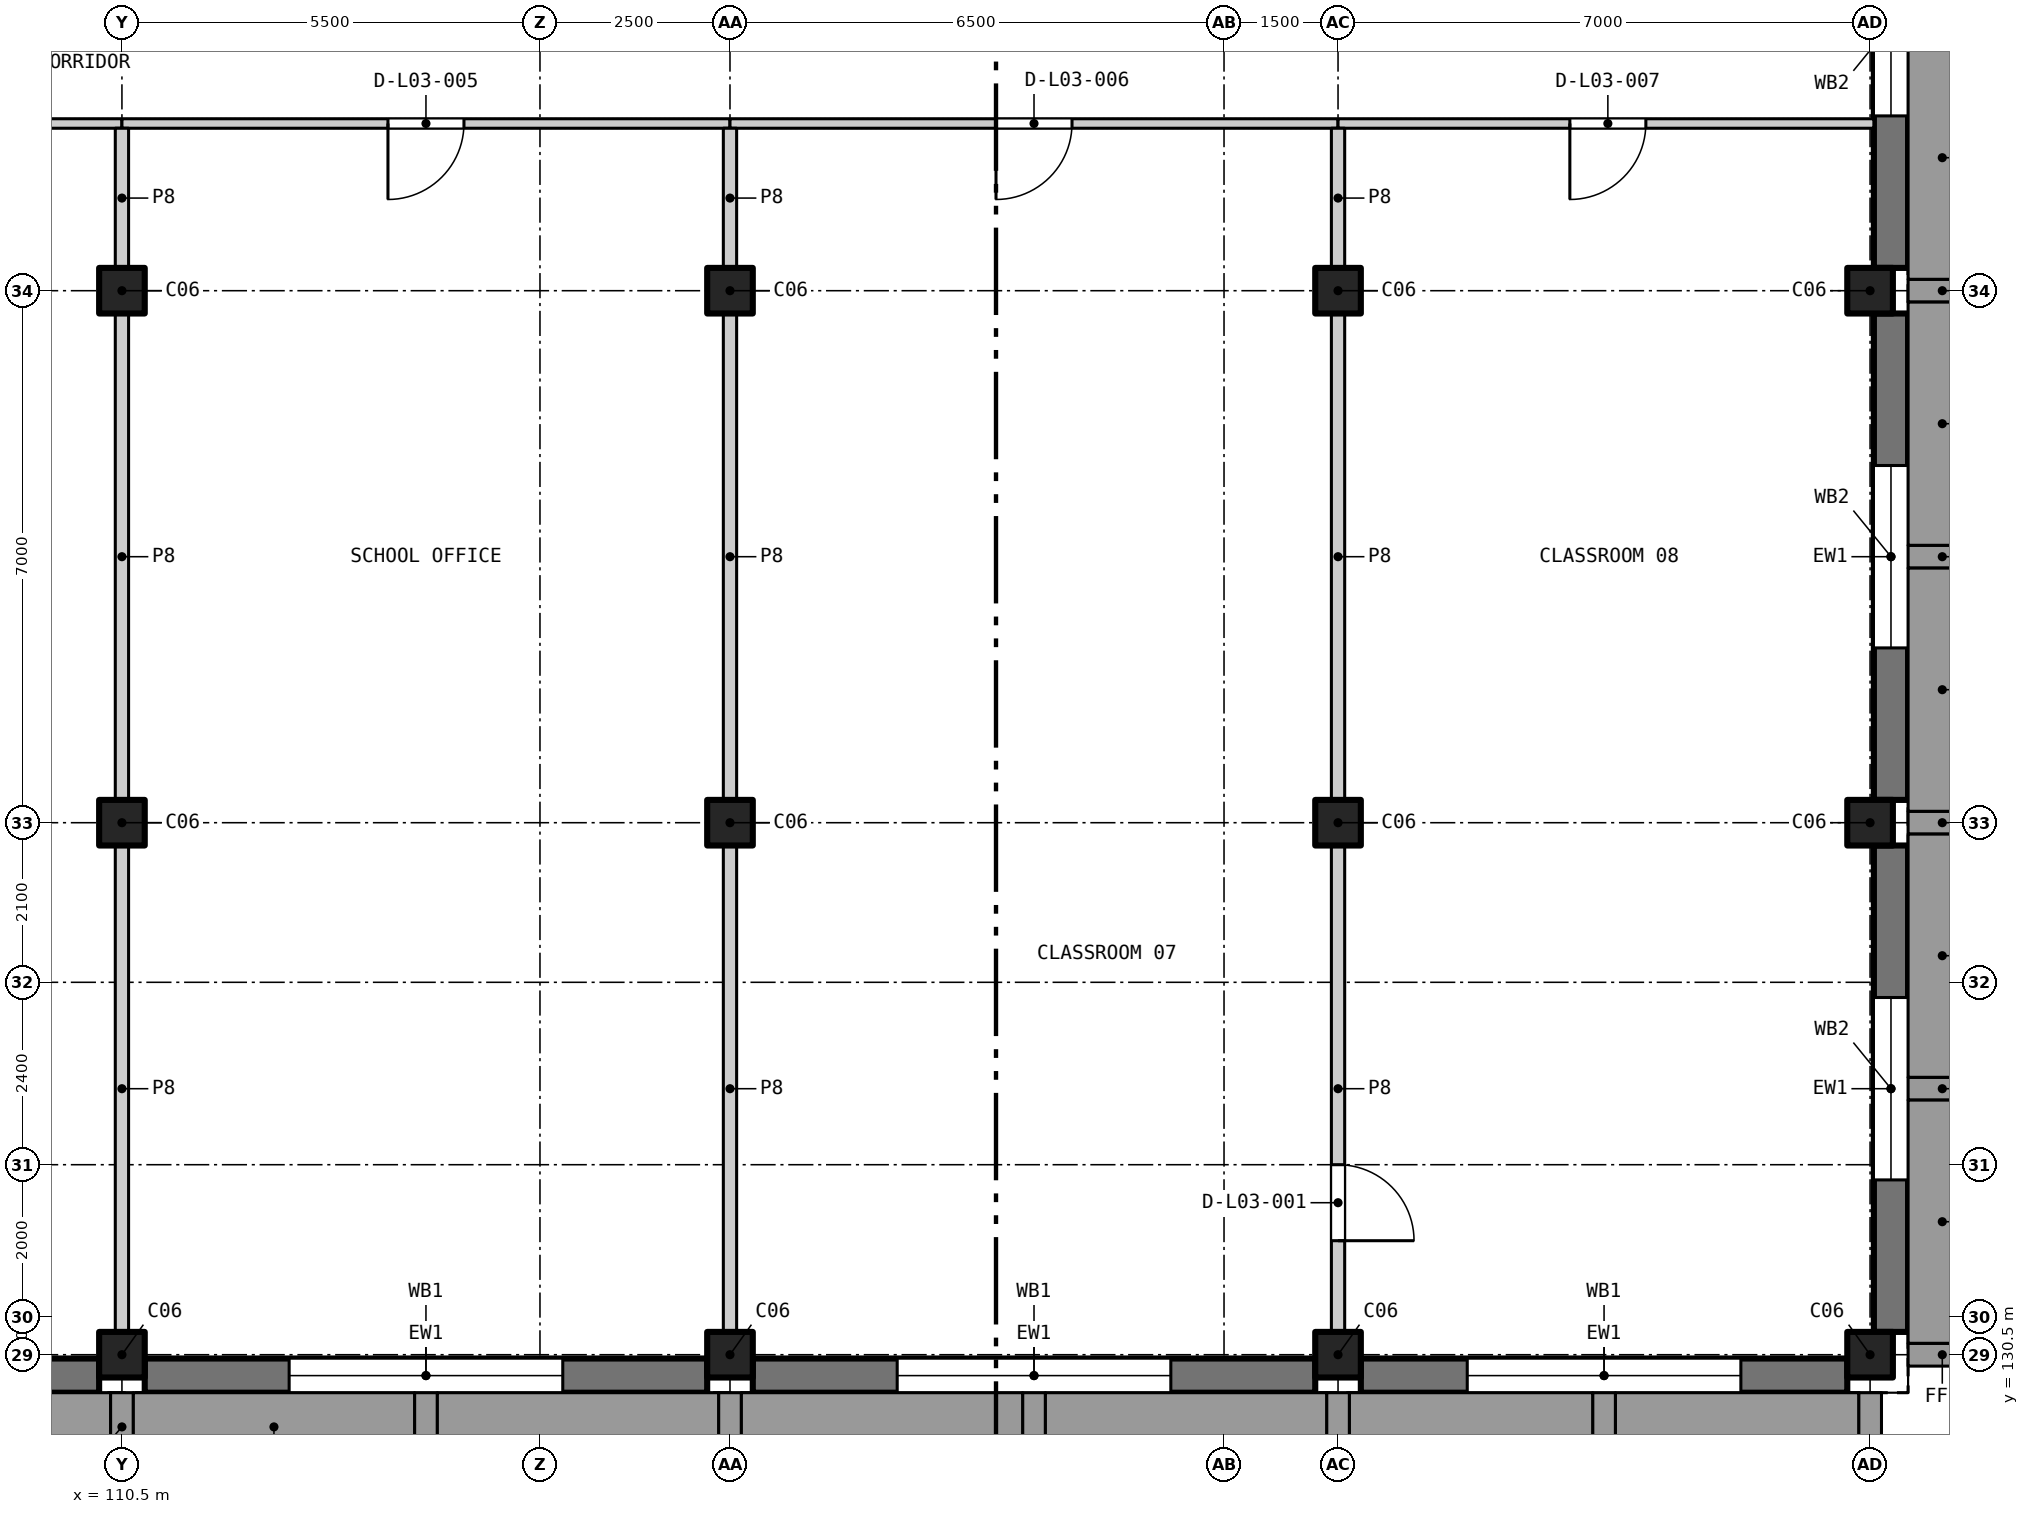
"""IFC4 building model, lengths in metres.
Left out: names, types, materials, properties, quantities, classifications, styles, units other than length and angle.
Written with IfcOpenShell. Run it as: python <this file> out.ifc"""

import sys

from ifc_helpers import new_model, si_unit, direction, frame, frame_2d, origin, origin_2d, place, context, subcontext, project, spatial, rectangle, extrude, element, fill, save


model = new_model("IFC4")
c1 = context("Model", 3, precision=1e-05, world=origin(), true_north=direction((0.0, 1.0)))
c2 = subcontext(c1, "Body", "Model", "MODEL_VIEW")
j1 = project(units=[si_unit("LENGTHUNIT", "METRE"), si_unit("PLANEANGLEUNIT", "RADIAN")], contexts=[c1])
p1 = place(None, origin())
s1 = spatial("IfcSite", under=j1, at=p1, CompositionType="ELEMENT")
p2 = place(p1, origin())
s2 = spatial("IfcBuilding", under=s1, at=p2, CompositionType="ELEMENT")
p3 = place(p2, frame((0.0, 0.0, 14.4)))
s3 = spatial("IfcBuildingStorey", under=s2, at=p3, CompositionType="ELEMENT", Elevation=14.4)
for number, where, z_axis, x_axis in (
    (1, (110.5, 130.5, 0.0), (0.0, 0.0, 1.0), (1.0, 0.0, 0.0)),
    (2, (110.5, 137.5, 0.0), (0.0, 0.0, 1.0), (1.0, 0.0, 0.0)),
    (3, (110.5, 144.5, 0.0), (0.0, 0.0, 1.0), (1.0, 0.0, 0.0)),
    (4, (118.5, 130.5, 0.0), (0.0, 0.0, 1.0), (1.0, 0.0, 0.0)),
    (5, (118.5, 137.5, 0.0), (0.0, 0.0, 1.0), (1.0, 0.0, 0.0)),
    (6, (118.5, 144.5, 0.0), (0.0, 0.0, 1.0), (1.0, 0.0, 0.0)),
    (7, (126.5, 130.5, 0.0), (0.0, 0.0, 1.0), (1.0, 0.0, 0.0)),
    (8, (126.5, 137.5, 0.0), (0.0, 0.0, 1.0), (1.0, 0.0, 0.0)),
    (9, (126.5, 144.5, 0.0), (0.0, 0.0, 1.0), (1.0, 0.0, 0.0)),
    (10, (133.5, 130.5, 0.0), (0.0, 0.0, 1.0), (1.0, 0.0, 0.0)),
    (11, (133.5, 137.5, 0.0), (0.0, 0.0, 1.0), (1.0, 0.0, 0.0)),
    (12, (133.5, 144.5, 0.0), (0.0, 0.0, 1.0), (1.0, 0.0, 0.0)),
):
    element("IfcColumn", number, at=place(p3, frame(where, z_axis=z_axis, x_axis=x_axis)), inside=s3, PredefinedType="COLUMN", context=c2, shape_type="SweptSolid", body=[
        extrude(rectangle(XDim=0.6, YDim=0.6, at=origin_2d()), origin(), (0.0, 0.0, 1.0), 3.9),
    ])
p4 = place(p3, frame((134.0, 130.125, 4.2), z_axis=(0.0, 0.0, 1.0), x_axis=(-1.0, 0.0, 0.0)))
e13 = element("IfcWall", 13, at=p4, inside=s3, PredefinedType="PARAPET", context=c2, shape_type="SweptSolid", body=[
    extrude(rectangle(XDim=48.0, YDim=0.25, at=frame_2d((24.0, 0.0))), origin(), (0.0, 0.0, 1.0), 1.1),
])
p5 = place(p3, frame((133.875, 165.75, 4.2), z_axis=(0.0, 0.0, 1.0), x_axis=(0.0, -1.0, 0.0)))
e14 = element("IfcWall", 14, at=p5, inside=s3, PredefinedType="PARAPET", context=c2, shape_type="SweptSolid", body=[
    extrude(rectangle(XDim=35.5, YDim=0.25, at=frame_2d((17.75, 0.0))), origin(), (0.0, 0.0, 1.0), 1.1),
])
p6 = place(p3, frame((110.2, 130.225, 0.0), z_axis=(0.0, 0.0, 1.0), x_axis=(-1.0, 0.0, 0.0)))
e15 = element("IfcWall", 15, at=p6, inside=s3, PredefinedType="SOLIDWALL", context=c2, shape_type="SweptSolid", body=[
    extrude(rectangle(XDim=7.4, YDim=0.45, at=frame_2d((3.7, 0.0))), origin(), (0.0, 0.0, 1.0), 3.0),
])
p7 = place(p6, frame((1.9, 0.0, 0.9)))
e16 = element("IfcOpeningElement", 16, at=p7, cuts=e15, PredefinedType="OPENING", context=c2, shape_type="SweptSolid", body=[
    extrude(rectangle(XDim=3.6, YDim=1.6, at=frame_2d((1.8, 0.8))), frame((0.0, 0.235, 0.0), z_axis=(0.0, -1.0, 0.0), x_axis=(1.0, 0.0, 0.0)), (0.0, 0.0, 1.0), 0.47),
])
p8 = place(p3, frame((118.2, 130.225, 0.0), z_axis=(0.0, 0.0, 1.0), x_axis=(-1.0, 0.0, 0.0)))
e17 = element("IfcWall", 17, at=p8, inside=s3, PredefinedType="SOLIDWALL", context=c2, shape_type="SweptSolid", body=[
    extrude(rectangle(XDim=7.4, YDim=0.45, at=frame_2d((3.7, 0.0))), origin(), (0.0, 0.0, 1.0), 3.0),
])
p9 = place(p8, frame((1.9, 0.0, 0.9)))
e18 = element("IfcOpeningElement", 18, at=p9, cuts=e17, PredefinedType="OPENING", context=c2, shape_type="SweptSolid", body=[
    extrude(rectangle(XDim=3.6, YDim=1.6, at=frame_2d((1.8, 0.8))), frame((0.0, 0.235, 0.0), z_axis=(0.0, -1.0, 0.0), x_axis=(1.0, 0.0, 0.0)), (0.0, 0.0, 1.0), 0.47),
])
p10 = place(p3, frame((126.2, 130.225, 0.0), z_axis=(0.0, 0.0, 1.0), x_axis=(-1.0, 0.0, 0.0)))
e19 = element("IfcWall", 19, at=p10, inside=s3, PredefinedType="SOLIDWALL", context=c2, shape_type="SweptSolid", body=[
    extrude(rectangle(XDim=7.4, YDim=0.45, at=frame_2d((3.7, 0.0))), origin(), (0.0, 0.0, 1.0), 3.0),
])
p11 = place(p10, frame((1.9, 0.0, 0.9)))
e20 = element("IfcOpeningElement", 20, at=p11, cuts=e19, PredefinedType="OPENING", context=c2, shape_type="SweptSolid", body=[
    extrude(rectangle(XDim=3.6, YDim=1.6, at=frame_2d((1.8, 0.8))), frame((0.0, 0.235, 0.0), z_axis=(0.0, -1.0, 0.0), x_axis=(1.0, 0.0, 0.0)), (0.0, 0.0, 1.0), 0.47),
])
p12 = place(p3, frame((133.2, 130.225, 0.0), z_axis=(0.0, 0.0, 1.0), x_axis=(-1.0, 0.0, 0.0)))
e21 = element("IfcWall", 21, at=p12, inside=s3, PredefinedType="SOLIDWALL", context=c2, shape_type="SweptSolid", body=[
    extrude(rectangle(XDim=6.4, YDim=0.45, at=frame_2d((3.2, 0.0))), origin(), (0.0, 0.0, 1.0), 3.0),
])
p13 = place(p12, frame((1.4, 0.0, 0.9)))
e22 = element("IfcOpeningElement", 22, at=p13, cuts=e21, PredefinedType="OPENING", context=c2, shape_type="SweptSolid", body=[
    extrude(rectangle(XDim=3.6, YDim=1.6, at=frame_2d((1.8, 0.8))), frame((0.0, 0.235, 0.0), z_axis=(0.0, -1.0, 0.0), x_axis=(1.0, 0.0, 0.0)), (0.0, 0.0, 1.0), 0.47),
])
p14 = place(p3, frame((133.775, 137.2, 0.0), z_axis=(0.0, 0.0, 1.0), x_axis=(0.0, -1.0, 0.0)))
e23 = element("IfcWall", 23, at=p14, inside=s3, PredefinedType="SOLIDWALL", context=c2, shape_type="SweptSolid", body=[
    extrude(rectangle(XDim=6.4, YDim=0.45, at=frame_2d((3.2, 0.0))), origin(), (0.0, 0.0, 1.0), 3.1),
])
p15 = place(p14, frame((2.0, 0.0, 0.9)))
e24 = element("IfcOpeningElement", 24, at=p15, cuts=e23, PredefinedType="OPENING", context=c2, shape_type="SweptSolid", body=[
    extrude(rectangle(XDim=2.4, YDim=1.6, at=frame_2d((1.2, 0.8))), frame((0.0, 0.235, 0.0), z_axis=(0.0, -1.0, 0.0), x_axis=(1.0, 0.0, 0.0)), (0.0, 0.0, 1.0), 0.47),
])
p16 = place(p3, frame((133.775, 144.2, 0.0), z_axis=(0.0, 0.0, 1.0), x_axis=(0.0, -1.0, 0.0)))
e25 = element("IfcWall", 25, at=p16, inside=s3, PredefinedType="SOLIDWALL", context=c2, shape_type="SweptSolid", body=[
    extrude(rectangle(XDim=6.4, YDim=0.45, at=frame_2d((3.2, 0.0))), origin(), (0.0, 0.0, 1.0), 3.1),
])
p17 = place(p16, frame((2.0, 0.0, 0.9)))
e26 = element("IfcOpeningElement", 26, at=p17, cuts=e25, PredefinedType="OPENING", context=c2, shape_type="SweptSolid", body=[
    extrude(rectangle(XDim=2.4, YDim=1.6, at=frame_2d((1.2, 0.8))), frame((0.0, 0.235, 0.0), z_axis=(0.0, -1.0, 0.0), x_axis=(1.0, 0.0, 0.0)), (0.0, 0.0, 1.0), 0.47),
])
p18 = place(p3, frame((133.775, 151.2, 0.0), z_axis=(0.0, 0.0, 1.0), x_axis=(0.0, -1.0, 0.0)))
e27 = element("IfcWall", 27, at=p18, inside=s3, PredefinedType="SOLIDWALL", context=c2, shape_type="SweptSolid", body=[
    extrude(rectangle(XDim=6.4, YDim=0.45, at=frame_2d((3.2, 0.0))), origin(), (0.0, 0.0, 1.0), 3.1),
])
p19 = place(p18, frame((2.0, 0.0, 0.9)))
e28 = element("IfcOpeningElement", 28, at=p19, cuts=e27, PredefinedType="OPENING", context=c2, shape_type="SweptSolid", body=[
    extrude(rectangle(XDim=2.4, YDim=1.6, at=frame_2d((1.2, 0.8))), frame((0.0, 0.235, 0.0), z_axis=(0.0, -1.0, 0.0), x_axis=(1.0, 0.0, 0.0)), (0.0, 0.0, 1.0), 0.47),
])
p20 = place(p3, frame((102.5, 146.7, 0.0), z_axis=(0.0, 0.0, 1.0), x_axis=(1.0, 0.0, 0.0)))
e29 = element("IfcWall", 29, at=p20, inside=s3, PredefinedType="PARTITIONING", context=c2, shape_type="SweptSolid", body=[
    extrude(rectangle(XDim=8.0, YDim=0.125, at=frame_2d((4.0, 0.0))), origin(), (0.0, 0.0, 1.0), 3.9),
])
p21 = place(p20, frame((3.5, 0.0, 0.0)))
e30 = element("IfcOpeningElement", 30, at=p21, cuts=e29, PredefinedType="OPENING", context=c2, shape_type="SweptSolid", body=[
    extrude(rectangle(XDim=1.0, YDim=2.1, at=frame_2d((0.5, 1.05))), frame((0.0, 0.073, 0.0), z_axis=(0.0, -1.0, 0.0), x_axis=(1.0, 0.0, 0.0)), (0.0, 0.0, 1.0), 0.145),
])
p22 = place(p3, frame((110.5, 146.7, 0.0), z_axis=(0.0, 0.0, 1.0), x_axis=(1.0, 0.0, 0.0)))
e31 = element("IfcWall", 31, at=p22, inside=s3, PredefinedType="PARTITIONING", context=c2, shape_type="SweptSolid", body=[
    extrude(rectangle(XDim=8.0, YDim=0.125, at=frame_2d((4.0, 0.0))), origin(), (0.0, 0.0, 1.0), 3.9),
])
p23 = place(p22, frame((3.5, 0.0, 0.0)))
e32 = element("IfcOpeningElement", 32, at=p23, cuts=e31, PredefinedType="OPENING", context=c2, shape_type="SweptSolid", body=[
    extrude(rectangle(XDim=1.0, YDim=2.1, at=frame_2d((0.5, 1.05))), frame((0.0, 0.073, 0.0), z_axis=(0.0, -1.0, 0.0), x_axis=(1.0, 0.0, 0.0)), (0.0, 0.0, 1.0), 0.145),
])
p24 = place(p3, frame((118.5, 146.7, 0.0), z_axis=(0.0, 0.0, 1.0), x_axis=(1.0, 0.0, 0.0)))
e33 = element("IfcWall", 33, at=p24, inside=s3, PredefinedType="PARTITIONING", context=c2, shape_type="SweptSolid", body=[
    extrude(rectangle(XDim=8.0, YDim=0.125, at=frame_2d((4.0, 0.0))), origin(), (0.0, 0.0, 1.0), 3.9),
])
p25 = place(p24, frame((3.5, 0.0, 0.0)))
e34 = element("IfcOpeningElement", 34, at=p25, cuts=e33, PredefinedType="OPENING", context=c2, shape_type="SweptSolid", body=[
    extrude(rectangle(XDim=1.0, YDim=2.1, at=frame_2d((0.5, 1.05))), frame((0.0, 0.073, 0.0), z_axis=(0.0, -1.0, 0.0), x_axis=(1.0, 0.0, 0.0)), (0.0, 0.0, 1.0), 0.145),
])
p26 = place(p3, frame((126.5, 146.7, 0.0), z_axis=(0.0, 0.0, 1.0), x_axis=(1.0, 0.0, 0.0)))
e35 = element("IfcWall", 35, at=p26, inside=s3, PredefinedType="PARTITIONING", context=c2, shape_type="SweptSolid", body=[
    extrude(rectangle(XDim=7.05, YDim=0.125, at=frame_2d((3.525, 0.0))), origin(), (0.0, 0.0, 1.0), 3.9),
])
p27 = place(p26, frame((3.05, 0.0, 0.0)))
e36 = element("IfcOpeningElement", 36, at=p27, cuts=e35, PredefinedType="OPENING", context=c2, shape_type="SweptSolid", body=[
    extrude(rectangle(XDim=1.0, YDim=2.1, at=frame_2d((0.5, 1.05))), frame((0.0, 0.073, 0.0), z_axis=(0.0, -1.0, 0.0), x_axis=(1.0, 0.0, 0.0)), (0.0, 0.0, 1.0), 0.145),
])
for number, where, z_axis, x_axis in (
    (37, (110.5, 130.8, 0.0), (0.0, 0.0, 1.0), (0.0, 1.0, 0.0)),
    (38, (110.5, 137.8, 0.0), (0.0, 0.0, 1.0), (0.0, 1.0, 0.0)),
):
    element("IfcWall", number, at=place(p3, frame(where, z_axis=z_axis, x_axis=x_axis)), inside=s3, PredefinedType="PARTITIONING", context=c2, shape_type="SweptSolid", body=[
        extrude(rectangle(XDim=6.4, YDim=0.175, at=frame_2d((3.2, 0.0))), origin(), (0.0, 0.0, 1.0), 3.1),
    ])
p28 = place(p3, frame((110.5, 144.8, 0.0), z_axis=(0.0, 0.0, 1.0), x_axis=(0.0, 1.0, 0.0)))
e39 = element("IfcWall", 39, at=p28, inside=s3, PredefinedType="PARTITIONING", context=c2, shape_type="SweptSolid", body=[
    extrude(rectangle(XDim=1.837, YDim=0.175, at=frame_2d((0.919, 0.0))), origin(), (0.0, 0.0, 1.0), 3.1),
])
for number, where, z_axis, x_axis in (
    (40, (118.5, 130.8, 0.0), (0.0, 0.0, 1.0), (0.0, 1.0, 0.0)),
    (41, (118.5, 137.8, 0.0), (0.0, 0.0, 1.0), (0.0, 1.0, 0.0)),
):
    element("IfcWall", number, at=place(p3, frame(where, z_axis=z_axis, x_axis=x_axis)), inside=s3, PredefinedType="PARTITIONING", context=c2, shape_type="SweptSolid", body=[
        extrude(rectangle(XDim=6.4, YDim=0.175, at=frame_2d((3.2, 0.0))), origin(), (0.0, 0.0, 1.0), 3.1),
    ])
p29 = place(p3, frame((118.5, 144.8, 0.0), z_axis=(0.0, 0.0, 1.0), x_axis=(0.0, 1.0, 0.0)))
e42 = element("IfcWall", 42, at=p29, inside=s3, PredefinedType="PARTITIONING", context=c2, shape_type="SweptSolid", body=[
    extrude(rectangle(XDim=1.837, YDim=0.175, at=frame_2d((0.919, 0.0))), origin(), (0.0, 0.0, 1.0), 3.1),
])
p30 = place(p3, frame((126.5, 130.8, 0.0), z_axis=(0.0, 0.0, 1.0), x_axis=(0.0, 1.0, 0.0)))
e43 = element("IfcWall", 43, at=p30, inside=s3, PredefinedType="PARTITIONING", context=c2, shape_type="SweptSolid", body=[
    extrude(rectangle(XDim=6.4, YDim=0.175, at=frame_2d((3.2, 0.0))), origin(), (0.0, 0.0, 1.0), 3.1),
])
p31 = place(p30, frame((1.2, 0.0, 0.0)))
e44 = element("IfcOpeningElement", 44, at=p31, cuts=e43, PredefinedType="OPENING", context=c2, shape_type="SweptSolid", body=[
    extrude(rectangle(XDim=1.0, YDim=2.1, at=frame_2d((0.5, 1.05))), frame((0.0, 0.097, 0.0), z_axis=(0.0, -1.0, 0.0), x_axis=(1.0, 0.0, 0.0)), (0.0, 0.0, 1.0), 0.195),
])
p32 = place(p3, frame((126.5, 137.8, 0.0), z_axis=(0.0, 0.0, 1.0), x_axis=(0.0, 1.0, 0.0)))
e45 = element("IfcWall", 45, at=p32, inside=s3, PredefinedType="PARTITIONING", context=c2, shape_type="SweptSolid", body=[
    extrude(rectangle(XDim=6.4, YDim=0.175, at=frame_2d((3.2, 0.0))), origin(), (0.0, 0.0, 1.0), 3.1),
])
p33 = place(p3, frame((126.5, 144.8, 0.0), z_axis=(0.0, 0.0, 1.0), x_axis=(0.0, 1.0, 0.0)))
e46 = element("IfcWall", 46, at=p33, inside=s3, PredefinedType="PARTITIONING", context=c2, shape_type="SweptSolid", body=[
    extrude(rectangle(XDim=1.837, YDim=0.175, at=frame_2d((0.919, 0.0))), origin(), (0.0, 0.0, 1.0), 3.1),
])
p34 = place(p9, origin())
e47 = element("IfcWindow", 47, at=p34, inside=s3, PartitioningType="SINGLE_PANEL", PredefinedType="WINDOW", context=c2, shape_type="SweptSolid", body=[
    extrude(rectangle(XDim=3.6, YDim=1.6, at=frame_2d((1.8, 0.8))), frame((0.0, -0.125, 0.0), z_axis=(0.0, -1.0, 0.0), x_axis=(1.0, 0.0, 0.0)), (0.0, 0.0, 1.0), 0.06),
])
fill(e18, e47)
p35 = place(p11, origin())
e48 = element("IfcWindow", 48, at=p35, inside=s3, PartitioningType="SINGLE_PANEL", PredefinedType="WINDOW", context=c2, shape_type="SweptSolid", body=[
    extrude(rectangle(XDim=3.6, YDim=1.6, at=frame_2d((1.8, 0.8))), frame((0.0, -0.125, 0.0), z_axis=(0.0, -1.0, 0.0), x_axis=(1.0, 0.0, 0.0)), (0.0, 0.0, 1.0), 0.06),
])
fill(e20, e48)
p36 = place(p13, origin())
e49 = element("IfcWindow", 49, at=p36, inside=s3, PartitioningType="SINGLE_PANEL", PredefinedType="WINDOW", context=c2, shape_type="SweptSolid", body=[
    extrude(rectangle(XDim=3.6, YDim=1.6, at=frame_2d((1.8, 0.8))), frame((0.0, -0.125, 0.0), z_axis=(0.0, -1.0, 0.0), x_axis=(1.0, 0.0, 0.0)), (0.0, 0.0, 1.0), 0.06),
])
fill(e22, e49)
p37 = place(p15, origin())
e50 = element("IfcWindow", 50, at=p37, inside=s3, PartitioningType="SINGLE_PANEL", PredefinedType="WINDOW", context=c2, shape_type="SweptSolid", body=[
    extrude(rectangle(XDim=2.4, YDim=1.6, at=frame_2d((1.2, 0.8))), frame((0.0, -0.125, 0.0), z_axis=(0.0, -1.0, 0.0), x_axis=(1.0, 0.0, 0.0)), (0.0, 0.0, 1.0), 0.06),
])
fill(e24, e50)
p38 = place(p17, origin())
e51 = element("IfcWindow", 51, at=p38, inside=s3, PartitioningType="SINGLE_PANEL", PredefinedType="WINDOW", context=c2, shape_type="SweptSolid", body=[
    extrude(rectangle(XDim=2.4, YDim=1.6, at=frame_2d((1.2, 0.8))), frame((0.0, -0.125, 0.0), z_axis=(0.0, -1.0, 0.0), x_axis=(1.0, 0.0, 0.0)), (0.0, 0.0, 1.0), 0.06),
])
fill(e26, e51)
p39 = place(p19, origin())
e52 = element("IfcWindow", 52, at=p39, inside=s3, PartitioningType="SINGLE_PANEL", PredefinedType="WINDOW", context=c2, shape_type="SweptSolid", body=[
    extrude(rectangle(XDim=2.4, YDim=1.6, at=frame_2d((1.2, 0.8))), frame((0.0, -0.125, 0.0), z_axis=(0.0, -1.0, 0.0), x_axis=(1.0, 0.0, 0.0)), (0.0, 0.0, 1.0), 0.06),
])
fill(e28, e52)
p40 = place(p31, frame((1.0, 0.0, 0.0), z_axis=(0.0, 0.0, 1.0), x_axis=(-1.0, 0.0, 0.0)))
e53 = element("IfcDoor", 53, at=p40, inside=s3, OperationType="SINGLE_SWING_RIGHT", PredefinedType="DOOR", context=c2, shape_type="SweptSolid", body=[
    extrude(rectangle(XDim=1.0, YDim=2.1, at=frame_2d((0.5, 1.05))), frame((0.0, 0.025, 0.0), z_axis=(0.0, -1.0, 0.0), x_axis=(1.0, 0.0, 0.0)), (0.0, 0.0, 1.0), 0.05),
])
fill(e44, e53)
p41 = place(p23, frame((1.0, 0.0, 0.0), z_axis=(0.0, 0.0, 1.0), x_axis=(-1.0, 0.0, 0.0)))
e54 = element("IfcDoor", 54, at=p41, inside=s3, OperationType="SINGLE_SWING_RIGHT", PredefinedType="DOOR", context=c2, shape_type="SweptSolid", body=[
    extrude(rectangle(XDim=1.0, YDim=2.1, at=frame_2d((0.5, 1.05))), frame((0.0, 0.025, 0.0), z_axis=(0.0, -1.0, 0.0), x_axis=(1.0, 0.0, 0.0)), (0.0, 0.0, 1.0), 0.05),
])
fill(e32, e54)
p42 = place(p25, frame((1.0, 0.0, 0.0), z_axis=(0.0, 0.0, 1.0), x_axis=(-1.0, 0.0, 0.0)))
e55 = element("IfcDoor", 55, at=p42, inside=s3, OperationType="SINGLE_SWING_RIGHT", PredefinedType="DOOR", context=c2, shape_type="SweptSolid", body=[
    extrude(rectangle(XDim=1.0, YDim=2.1, at=frame_2d((0.5, 1.05))), frame((0.0, 0.025, 0.0), z_axis=(0.0, -1.0, 0.0), x_axis=(1.0, 0.0, 0.0)), (0.0, 0.0, 1.0), 0.05),
])
fill(e34, e55)
p43 = place(p27, frame((1.0, 0.0, 0.0), z_axis=(0.0, 0.0, 1.0), x_axis=(-1.0, 0.0, 0.0)))
e56 = element("IfcDoor", 56, at=p43, inside=s3, OperationType="SINGLE_SWING_RIGHT", PredefinedType="DOOR", context=c2, shape_type="SweptSolid", body=[
    extrude(rectangle(XDim=1.0, YDim=2.1, at=frame_2d((0.5, 1.05))), frame((0.0, 0.025, 0.0), z_axis=(0.0, -1.0, 0.0), x_axis=(1.0, 0.0, 0.0)), (0.0, 0.0, 1.0), 0.05),
])
fill(e36, e56)
save(model, sys.argv[1])
